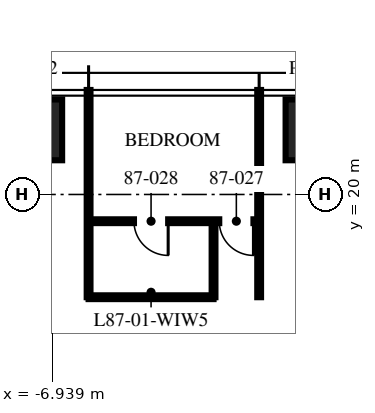
"""IFC4 building model, lengths in metres.
Left out: names, types, materials, properties, quantities, classifications, styles, units other than length and angle.
Written with IfcOpenShell. Run it as: python <this file> out.ifc"""

import sys

from ifc_helpers import new_model, si_unit, direction, frame, frame_2d, origin, origin_2d, place, context, subcontext, project, spatial, rectangle, extrude, element, fill, save


model = new_model("IFC4")
c1 = context("Model", 3, precision=1e-05, world=origin(), true_north=direction((0.0, 1.0)))
c2 = subcontext(c1, "Body", "Model", "MODEL_VIEW")
j1 = project(units=[si_unit("LENGTHUNIT", "METRE"), si_unit("PLANEANGLEUNIT", "RADIAN")], contexts=[c1])
p1 = place(None, origin())
s1 = spatial("IfcSite", under=j1, at=p1, CompositionType="ELEMENT")
p2 = place(p1, origin())
s2 = spatial("IfcBuilding", under=s1, at=p2, CompositionType="ELEMENT")
p3 = place(p2, frame((0.0, 0.0, 345.75)))
s3 = spatial("IfcBuildingStorey", under=s2, at=p3, CompositionType="ELEMENT", Elevation=345.75)
for number, where, z_axis, x_axis in (
    (1, (-7.48, 21.7, 0.0), (0.0, 0.0, 1.0), (1.0, 0.0, 0.0)),
    (2, (0.0, 21.7, 0.0), (0.0, 0.0, 1.0), (1.0, 0.0, 0.0)),
):
    element("IfcColumn", number, at=place(p3, frame(where, z_axis=z_axis, x_axis=x_axis)), inside=s3, PredefinedType="COLUMN", context=c2, shape_type="SweptSolid", body=[
        extrude(rectangle(XDim=1.6, YDim=1.6, at=origin_2d()), origin(), (0.0, 0.0, 1.0), 3.75),
    ])
for number, where, z_axis, x_axis in (
    (3, (-1.496, 17.296, 0.0), (0.0, 0.0, 1.0), (0.0, 1.0, 0.0)),
    (4, (-5.984, 17.296, 0.0), (0.0, 0.0, 1.0), (0.0, 1.0, 0.0)),
):
    element("IfcWall", number, at=place(p3, frame(where, z_axis=z_axis, x_axis=x_axis)), inside=s3, PredefinedType="PARTITIONING", context=c2, shape_type="SweptSolid", body=[
        extrude(rectangle(XDim=5.454, YDim=0.1, at=frame_2d((2.727, 0.0))), origin(), (0.0, 0.0, 1.0), 2.91),
    ])
p4 = place(p3, frame((-1.496, 19.296, 0.0), z_axis=(0.0, 0.0, 1.0), x_axis=(-1.0, 0.0, 0.0)))
e5 = element("IfcWall", 5, at=p4, inside=s3, PredefinedType="PARTITIONING", context=c2, shape_type="SweptSolid", body=[
    extrude(rectangle(XDim=4.488, YDim=0.1, at=frame_2d((2.244, 0.0))), origin(), (0.0, 0.0, 1.0), 2.81),
])
p5 = place(p4, frame((0.15, 0.0, 0.0)))
e6 = element("IfcOpeningElement", 6, at=p5, cuts=e5, PredefinedType="OPENING", context=c2, shape_type="SweptSolid", body=[
    extrude(rectangle(XDim=0.9, YDim=2.1, at=frame_2d((0.45, 1.05))), frame((0.0, 0.06, 0.0), z_axis=(0.0, -1.0, 0.0), x_axis=(1.0, 0.0, 0.0)), (0.0, 0.0, 1.0), 0.12),
])
p6 = place(p4, frame((2.394, 0.0, 0.0)))
e7 = element("IfcOpeningElement", 7, at=p6, cuts=e5, PredefinedType="OPENING", context=c2, shape_type="SweptSolid", body=[
    extrude(rectangle(XDim=0.9, YDim=2.1, at=frame_2d((0.45, 1.05))), frame((0.0, 0.06, 0.0), z_axis=(0.0, -1.0, 0.0), x_axis=(1.0, 0.0, 0.0)), (0.0, 0.0, 1.0), 0.12),
])
p7 = place(p3, frame((-2.696, 17.296, 0.0), z_axis=(0.0, 0.0, 1.0), x_axis=(0.0, 1.0, 0.0)))
e8 = element("IfcWall", 8, at=p7, inside=s3, PredefinedType="PARTITIONING", context=c2, shape_type="SweptSolid", body=[
    extrude(rectangle(XDim=2.0, YDim=0.1, at=frame_2d((1.0, 0.0))), origin(), (0.0, 0.0, 1.0), 3.5),
])
p8 = place(p3, frame((-2.696, 17.296, 0.0), z_axis=(0.0, 0.0, 1.0), x_axis=(-1.0, 0.0, 0.0)))
e9 = element("IfcWall", 9, at=p8, inside=s3, PredefinedType="PARTITIONING", context=c2, shape_type="SweptSolid", body=[
    extrude(rectangle(XDim=3.288, YDim=0.1, at=frame_2d((1.644, 0.0))), origin(), (0.0, 0.0, 1.0), 2.81),
])
p9 = place(p5, origin())
e10 = element("IfcDoor", 10, at=p9, inside=s3, OperationType="SINGLE_SWING_LEFT", PredefinedType="DOOR", context=c2, shape_type="SweptSolid", body=[
    extrude(rectangle(XDim=0.9, YDim=2.1, at=frame_2d((0.45, 1.05))), frame((0.0, 0.025, 0.0), z_axis=(0.0, -1.0, 0.0), x_axis=(1.0, 0.0, 0.0)), (0.0, 0.0, 1.0), 0.05),
])
fill(e6, e10)
p10 = place(p6, origin())
e11 = element("IfcDoor", 11, at=p10, inside=s3, OperationType="SINGLE_SWING_LEFT", PredefinedType="DOOR", context=c2, shape_type="SweptSolid", body=[
    extrude(rectangle(XDim=0.9, YDim=2.1, at=frame_2d((0.45, 1.05))), frame((0.0, 0.025, 0.0), z_axis=(0.0, -1.0, 0.0), x_axis=(1.0, 0.0, 0.0)), (0.0, 0.0, 1.0), 0.05),
])
fill(e7, e11)
save(model, sys.argv[1])
